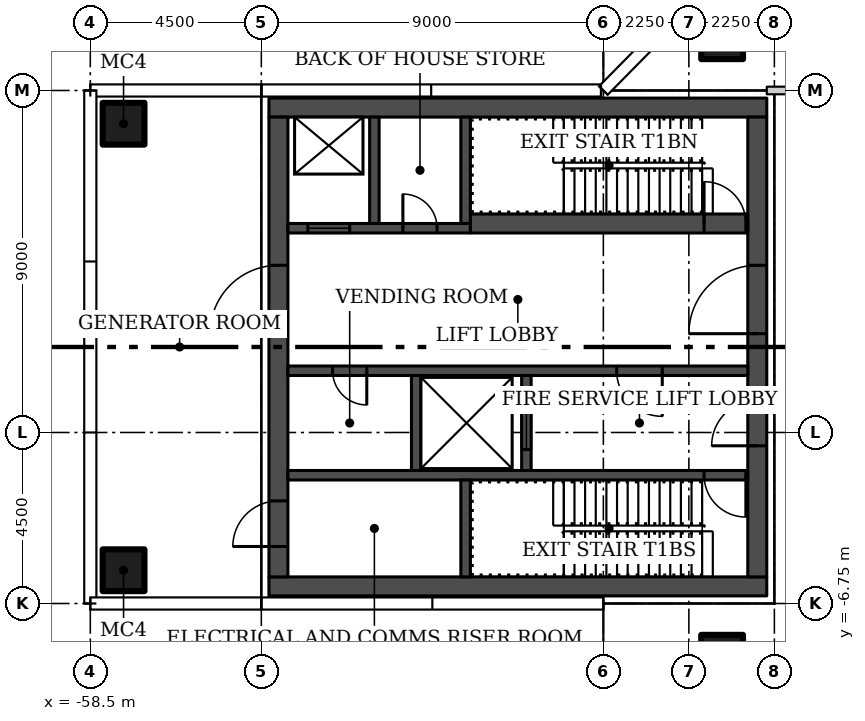
"""IFC4 building model, lengths in metres.
Left out: names, types, materials, properties, quantities, classifications, styles, units other than length and angle.
Written with IfcOpenShell. Run it as: python <this file> out.ifc"""

import sys

from ifc_helpers import new_model, si_unit, direction, frame, frame_2d, origin, origin_2d, place, context, subcontext, project, spatial, rectangle, hollow_rectangle, extrude, element, fill, save


model = new_model("IFC4")
c1 = context("Model", 3, precision=1e-05, world=origin(), true_north=direction((0.0, 1.0)))
c2 = subcontext(c1, "Body", "Model", "MODEL_VIEW")
j1 = project(units=[si_unit("LENGTHUNIT", "METRE"), si_unit("PLANEANGLEUNIT", "RADIAN")], contexts=[c1])
p1 = place(None, origin())
s1 = spatial("IfcSite", under=j1, at=p1, CompositionType="ELEMENT")
p2 = place(p1, origin())
s2 = spatial("IfcBuilding", under=s1, at=p2, CompositionType="ELEMENT")
p3 = place(p2, frame((0.0, 0.0, 177.9)))
s3 = spatial("IfcBuildingStorey", under=s2, at=p3, CompositionType="ELEMENT", Elevation=177.9)
for number, where in (
    (1, (-41.875, 8.125, 0.0)),
    (2, (-41.875, -8.125, 0.0)),
    (3, (-57.625, -5.875, 0.0)),
    (4, (-57.625, 5.875, 0.0)),
):
    element("IfcColumn", number, at=place(p3, frame(where)), inside=s3, PredefinedType="COLUMN", context=c2, shape_type="SweptSolid", body=[
        extrude(hollow_rectangle(XDim=1.1, YDim=1.1, WallThickness=0.04, at=origin_2d()), origin(), (0.0, 0.0, 1.0), 4.45),
    ])
p4 = place(p3, frame((-26.8, 6.75, 0.0), z_axis=(0.0, 0.0, 1.0), x_axis=(-1.0, 0.0, 0.0)))
e5 = element("IfcWall", 5, at=p4, inside=s3, PredefinedType="PARTITIONING", context=c2, shape_type="SweptSolid", body=[
    extrude(rectangle(XDim=13.9, YDim=0.2, at=frame_2d((6.95, 0.0))), origin(), (0.0, 0.0, 1.0), 4.45),
])
p5 = place(p4, frame((6.2, 0.0, 0.0)))
e6 = element("IfcOpeningElement", 6, at=p5, cuts=e5, PredefinedType="OPENING", context=c2, shape_type="SweptSolid", body=[
    extrude(rectangle(XDim=1.5, YDim=2.4, at=frame_2d((0.75, 1.2))), frame((0.0, 0.11, 0.0), z_axis=(0.0, -1.0, 0.0), x_axis=(1.0, 0.0, 0.0)), (0.0, 0.0, 1.0), 0.22),
])
for number, where, z_axis, x_axis in (
    (7, (-40.7, -6.3, 0.0), (0.0, 0.0, 1.0), (-1.0, 0.0, 0.0)),
    (8, (-40.7, 6.3, 0.0), (0.0, 0.0, 1.0), (-1.0, 0.0, 0.0)),
):
    element("IfcWall", number, at=place(p3, frame(where, z_axis=z_axis, x_axis=x_axis)), inside=s3, PredefinedType="SHEAR", context=c2, shape_type="SweptSolid", body=[
        extrude(rectangle(XDim=13.1, YDim=0.5, at=frame_2d((6.55, 0.0))), origin(), (0.0, 0.0, 1.0), 4.45),
    ])
p6 = place(p3, frame((-40.95, -6.05, 0.0), z_axis=(0.0, 0.0, 1.0), x_axis=(0.0, 1.0, 0.0)))
e9 = element("IfcWall", 9, at=p6, inside=s3, PredefinedType="SHEAR", context=c2, shape_type="SweptSolid", body=[
    extrude(rectangle(XDim=12.1, YDim=0.5, at=frame_2d((6.05, 0.0))), origin(), (0.0, 0.0, 1.0), 4.45),
])
p7 = place(p6, frame((3.45, 0.0, 0.0)))
e10 = element("IfcOpeningElement", 10, at=p7, cuts=e9, PredefinedType="OPENING", context=c2, shape_type="SweptSolid", body=[
    extrude(rectangle(XDim=1.2, YDim=2.1, at=frame_2d((0.6, 1.05))), frame((0.0, 0.26, 0.0), z_axis=(0.0, -1.0, 0.0), x_axis=(1.0, 0.0, 0.0)), (0.0, 0.0, 1.0), 0.52),
])
p8 = place(p6, frame((6.4, 0.0, 0.0)))
e11 = element("IfcOpeningElement", 11, at=p8, cuts=e9, PredefinedType="OPENING", context=c2, shape_type="SweptSolid", body=[
    extrude(rectangle(XDim=1.8, YDim=2.4, at=frame_2d((0.9, 1.2))), frame((0.0, 0.26, 0.0), z_axis=(0.0, -1.0, 0.0), x_axis=(1.0, 0.0, 0.0)), (0.0, 0.0, 1.0), 0.52),
])
p9 = place(p3, frame((-53.55, -6.05, 0.0), z_axis=(0.0, 0.0, 1.0), x_axis=(0.0, 1.0, 0.0)))
e12 = element("IfcWall", 12, at=p9, inside=s3, PredefinedType="SHEAR", context=c2, shape_type="SweptSolid", body=[
    extrude(rectangle(XDim=12.1, YDim=0.5, at=frame_2d((6.05, 0.0))), origin(), (0.0, 0.0, 1.0), 4.45),
])
p10 = place(p9, frame((0.8, 0.0, 0.0)))
e13 = element("IfcOpeningElement", 13, at=p10, cuts=e12, PredefinedType="OPENING", context=c2, shape_type="SweptSolid", body=[
    extrude(rectangle(XDim=1.2, YDim=2.1, at=frame_2d((0.6, 1.05))), frame((0.0, 0.26, 0.0), z_axis=(0.0, -1.0, 0.0), x_axis=(1.0, 0.0, 0.0)), (0.0, 0.0, 1.0), 0.52),
])
p11 = place(p9, frame((6.4, 0.0, 0.0)))
e14 = element("IfcOpeningElement", 14, at=p11, cuts=e12, PredefinedType="OPENING", context=c2, shape_type="SweptSolid", body=[
    extrude(rectangle(XDim=1.8, YDim=2.4, at=frame_2d((0.9, 1.2))), frame((0.0, 0.26, 0.0), z_axis=(0.0, -1.0, 0.0), x_axis=(1.0, 0.0, 0.0)), (0.0, 0.0, 1.0), 0.52),
])
p12 = place(p3, frame((-41.2, -3.375, 0.0), z_axis=(0.0, 0.0, 1.0), x_axis=(-1.0, 0.0, 0.0)))
e15 = element("IfcWall", 15, at=p12, inside=s3, PredefinedType="SHEAR", context=c2, shape_type="SweptSolid", body=[
    extrude(rectangle(XDim=12.1, YDim=0.25, at=frame_2d((6.05, 0.0))), origin(), (0.0, 0.0, 1.0), 4.45),
])
p13 = place(p12, frame((0.05, 0.0, 0.0)))
e16 = element("IfcOpeningElement", 16, at=p13, cuts=e15, PredefinedType="OPENING", context=c2, shape_type="SweptSolid", body=[
    extrude(rectangle(XDim=1.1, YDim=2.1, at=frame_2d((0.55, 1.05))), frame((0.0, 0.135, 0.0), z_axis=(0.0, -1.0, 0.0), x_axis=(1.0, 0.0, 0.0)), (0.0, 0.0, 1.0), 0.27),
])
p14 = place(p3, frame((-48.625, -6.05, 0.0), z_axis=(0.0, 0.0, 1.0), x_axis=(0.0, 1.0, 0.0)))
e17 = element("IfcWall", 17, at=p14, inside=s3, PredefinedType="SHEAR", context=c2, shape_type="SweptSolid", body=[
    extrude(rectangle(XDim=2.55, YDim=0.25, at=frame_2d((1.275, 0.0))), origin(), (0.0, 0.0, 1.0), 4.45),
])
p15 = place(p3, frame((-41.2, -0.625, 0.0), z_axis=(0.0, 0.0, 1.0), x_axis=(-1.0, 0.0, 0.0)))
e18 = element("IfcWall", 18, at=p15, inside=s3, PredefinedType="SHEAR", context=c2, shape_type="SweptSolid", body=[
    extrude(rectangle(XDim=12.1, YDim=0.25, at=frame_2d((6.05, 0.0))), origin(), (0.0, 0.0, 1.0), 4.45),
])
p16 = place(p15, frame((2.25, 0.0, 0.0)))
e19 = element("IfcOpeningElement", 19, at=p16, cuts=e18, PredefinedType="OPENING", context=c2, shape_type="SweptSolid", body=[
    extrude(rectangle(XDim=1.2, YDim=2.1, at=frame_2d((0.6, 1.05))), frame((0.0, 0.135, 0.0), z_axis=(0.0, -1.0, 0.0), x_axis=(1.0, 0.0, 0.0)), (0.0, 0.0, 1.0), 0.27),
])
p17 = place(p15, frame((10.025, 0.0, 0.0)))
e20 = element("IfcOpeningElement", 20, at=p17, cuts=e18, PredefinedType="OPENING", context=c2, shape_type="SweptSolid", body=[
    extrude(rectangle(XDim=0.9, YDim=2.1, at=frame_2d((0.45, 1.05))), frame((0.0, 0.135, 0.0), z_axis=(0.0, -1.0, 0.0), x_axis=(1.0, 0.0, 0.0)), (0.0, 0.0, 1.0), 0.27),
])
p18 = place(p3, frame((-47.025, -3.25, 0.0), z_axis=(0.0, 0.0, 1.0), x_axis=(0.0, 1.0, 0.0)))
e21 = element("IfcWall", 21, at=p18, inside=s3, PredefinedType="SHEAR", context=c2, shape_type="SweptSolid", body=[
    extrude(rectangle(XDim=2.5, YDim=0.25, at=frame_2d((1.25, 0.0))), origin(), (0.0, 0.0, 1.0), 4.45),
])
p19 = place(p18, frame((0.55, 0.0, 0.0)))
e22 = element("IfcOpeningElement", 22, at=p19, cuts=e21, PredefinedType="OPENING", context=c2, shape_type="SweptSolid", body=[
    extrude(rectangle(XDim=1.4, YDim=2.4, at=frame_2d((0.7, 1.2))), frame((0.0, 0.135, 0.0), z_axis=(0.0, -1.0, 0.0), x_axis=(1.0, 0.0, 0.0)), (0.0, 0.0, 1.0), 0.27),
])
p20 = place(p3, frame((-49.925, -3.25, 0.0), z_axis=(0.0, 0.0, 1.0), x_axis=(0.0, 1.0, 0.0)))
e23 = element("IfcWall", 23, at=p20, inside=s3, PredefinedType="SHEAR", context=c2, shape_type="SweptSolid", body=[
    extrude(rectangle(XDim=2.5, YDim=0.25, at=frame_2d((1.25, 0.0))), origin(), (0.0, 0.0, 1.0), 4.45),
])
p21 = place(p3, frame((-48.5, 3.25, 0.0)))
e24 = element("IfcWall", 24, at=p21, inside=s3, PredefinedType="SHEAR", context=c2, shape_type="SweptSolid", body=[
    extrude(rectangle(XDim=7.3, YDim=0.5, at=frame_2d((3.65, 0.0))), origin(), (0.0, 0.0, 1.0), 4.45),
])
p22 = place(p21, frame((6.15, 0.0, 0.0)))
e25 = element("IfcOpeningElement", 25, at=p22, cuts=e24, PredefinedType="OPENING", context=c2, shape_type="SweptSolid", body=[
    extrude(rectangle(XDim=1.1, YDim=2.1, at=frame_2d((0.55, 1.05))), frame((0.0, 0.26, 0.0), z_axis=(0.0, -1.0, 0.0), x_axis=(1.0, 0.0, 0.0)), (0.0, 0.0, 1.0), 0.52),
])
p23 = place(p3, frame((-53.3, 3.125, 0.0)))
e26 = element("IfcWall", 26, at=p23, inside=s3, PredefinedType="SHEAR", context=c2, shape_type="SweptSolid", body=[
    extrude(rectangle(XDim=4.8, YDim=0.25, at=frame_2d((2.4, 0.0))), origin(), (0.0, 0.0, 1.0), 4.45),
])
p24 = place(p23, frame((0.525, 0.0, 0.0)))
e27 = element("IfcOpeningElement", 27, at=p24, cuts=e26, PredefinedType="OPENING", context=c2, shape_type="SweptSolid", body=[
    extrude(rectangle(XDim=1.1, YDim=2.1, at=frame_2d((0.55, 1.05))), frame((0.0, 0.135, 0.0), z_axis=(0.0, -1.0, 0.0), x_axis=(1.0, 0.0, 0.0)), (0.0, 0.0, 1.0), 0.27),
])
p25 = place(p23, frame((3.025, 0.0, 0.0)))
e28 = element("IfcOpeningElement", 28, at=p25, cuts=e26, PredefinedType="OPENING", context=c2, shape_type="SweptSolid", body=[
    extrude(rectangle(XDim=0.9, YDim=2.1, at=frame_2d((0.45, 1.05))), frame((0.0, 0.135, 0.0), z_axis=(0.0, -1.0, 0.0), x_axis=(1.0, 0.0, 0.0)), (0.0, 0.0, 1.0), 0.27),
])
for number, where, z_axis, x_axis in (
    (29, (-48.625, 3.25, 0.0), (0.0, 0.0, 1.0), (0.0, 1.0, 0.0)),
    (30, (-51.025, 3.25, 0.0), (0.0, 0.0, 1.0), (0.0, 1.0, 0.0)),
):
    element("IfcWall", number, at=place(p3, frame(where, z_axis=z_axis, x_axis=x_axis)), inside=s3, PredefinedType="SHEAR", context=c2, shape_type="SweptSolid", body=[
        extrude(rectangle(XDim=2.8, YDim=0.25, at=frame_2d((1.4, 0.0))), origin(), (0.0, 0.0, 1.0), 4.45),
    ])
p26 = place(p7, origin())
e31 = element("IfcDoor", 31, at=p26, inside=s3, OperationType="SINGLE_SWING_LEFT", PredefinedType="DOOR", context=c2, shape_type="SweptSolid", body=[
    extrude(rectangle(XDim=1.2, YDim=2.1, at=frame_2d((0.6, 1.05))), frame((0.0, 0.025, 0.0), z_axis=(0.0, -1.0, 0.0), x_axis=(1.0, 0.0, 0.0)), (0.0, 0.0, 1.0), 0.05),
])
fill(e10, e31)
p27 = place(p8, origin())
e32 = element("IfcDoor", 32, at=p27, inside=s3, OperationType="DOUBLE_DOOR_SINGLE_SWING", PredefinedType="DOOR", context=c2, shape_type="SweptSolid", body=[
    extrude(rectangle(XDim=1.8, YDim=2.4, at=frame_2d((0.9, 1.2))), frame((0.0, 0.025, 0.0), z_axis=(0.0, -1.0, 0.0), x_axis=(1.0, 0.0, 0.0)), (0.0, 0.0, 1.0), 0.05),
])
fill(e11, e32)
p28 = place(p10, origin())
e33 = element("IfcDoor", 33, at=p28, inside=s3, OperationType="SINGLE_SWING_LEFT", PredefinedType="DOOR", context=c2, shape_type="SweptSolid", body=[
    extrude(rectangle(XDim=1.2, YDim=2.1, at=frame_2d((0.6, 1.05))), frame((0.0, 0.025, 0.0), z_axis=(0.0, -1.0, 0.0), x_axis=(1.0, 0.0, 0.0)), (0.0, 0.0, 1.0), 0.05),
])
fill(e13, e33)
p29 = place(p11, origin())
e34 = element("IfcDoor", 34, at=p29, inside=s3, OperationType="DOUBLE_DOOR_SINGLE_SWING", PredefinedType="DOOR", context=c2, shape_type="SweptSolid", body=[
    extrude(rectangle(XDim=1.8, YDim=2.4, at=frame_2d((0.9, 1.2))), frame((0.0, 0.025, 0.0), z_axis=(0.0, -1.0, 0.0), x_axis=(1.0, 0.0, 0.0)), (0.0, 0.0, 1.0), 0.05),
])
fill(e14, e34)
p30 = place(p13, origin())
e35 = element("IfcDoor", 35, at=p30, inside=s3, OperationType="SINGLE_SWING_LEFT", PredefinedType="DOOR", context=c2, shape_type="SweptSolid", body=[
    extrude(rectangle(XDim=1.1, YDim=2.1, at=frame_2d((0.55, 1.05))), frame((0.0, 0.025, 0.0), z_axis=(0.0, -1.0, 0.0), x_axis=(1.0, 0.0, 0.0)), (0.0, 0.0, 1.0), 0.05),
])
fill(e16, e35)
p31 = place(p16, origin())
e36 = element("IfcDoor", 36, at=p31, inside=s3, OperationType="SINGLE_SWING_LEFT", PredefinedType="DOOR", context=c2, shape_type="SweptSolid", body=[
    extrude(rectangle(XDim=1.2, YDim=2.1, at=frame_2d((0.6, 1.05))), frame((0.0, 0.025, 0.0), z_axis=(0.0, -1.0, 0.0), x_axis=(1.0, 0.0, 0.0)), (0.0, 0.0, 1.0), 0.05),
])
fill(e19, e36)
p32 = place(p17, origin())
e37 = element("IfcDoor", 37, at=p32, inside=s3, OperationType="SINGLE_SWING_RIGHT", PredefinedType="DOOR", context=c2, shape_type="SweptSolid", body=[
    extrude(rectangle(XDim=0.9, YDim=2.1, at=frame_2d((0.45, 1.05))), frame((0.0, 0.025, 0.0), z_axis=(0.0, -1.0, 0.0), x_axis=(1.0, 0.0, 0.0)), (0.0, 0.0, 1.0), 0.05),
])
fill(e20, e37)
p33 = place(p19, origin())
e38 = element("IfcDoor", 38, at=p33, inside=s3, OperationType="SLIDING_TO_LEFT", PredefinedType="DOOR", context=c2, shape_type="SweptSolid", body=[
    extrude(rectangle(XDim=1.4, YDim=2.4, at=frame_2d((0.7, 1.2))), frame((0.0, 0.025, 0.0), z_axis=(0.0, -1.0, 0.0), x_axis=(1.0, 0.0, 0.0)), (0.0, 0.0, 1.0), 0.05),
])
fill(e22, e38)
p34 = place(p22, origin())
e39 = element("IfcDoor", 39, at=p34, inside=s3, OperationType="SINGLE_SWING_RIGHT", PredefinedType="DOOR", context=c2, shape_type="SweptSolid", body=[
    extrude(rectangle(XDim=1.1, YDim=2.1, at=frame_2d((0.55, 1.05))), frame((0.0, 0.025, 0.0), z_axis=(0.0, -1.0, 0.0), x_axis=(1.0, 0.0, 0.0)), (0.0, 0.0, 1.0), 0.05),
])
fill(e25, e39)
p35 = place(p24, origin())
e40 = element("IfcDoor", 40, at=p35, inside=s3, OperationType="SLIDING_TO_LEFT", PredefinedType="DOOR", context=c2, shape_type="SweptSolid", body=[
    extrude(rectangle(XDim=1.1, YDim=2.1, at=frame_2d((0.55, 1.05))), frame((0.0, 0.025, 0.0), z_axis=(0.0, -1.0, 0.0), x_axis=(1.0, 0.0, 0.0)), (0.0, 0.0, 1.0), 0.05),
])
fill(e27, e40)
p36 = place(p25, origin())
e41 = element("IfcDoor", 41, at=p36, inside=s3, OperationType="SINGLE_SWING_RIGHT", PredefinedType="DOOR", context=c2, shape_type="SweptSolid", body=[
    extrude(rectangle(XDim=0.9, YDim=2.1, at=frame_2d((0.45, 1.05))), frame((0.0, 0.025, 0.0), z_axis=(0.0, -1.0, 0.0), x_axis=(1.0, 0.0, 0.0)), (0.0, 0.0, 1.0), 0.05),
])
fill(e28, e41)
save(model, sys.argv[1])
